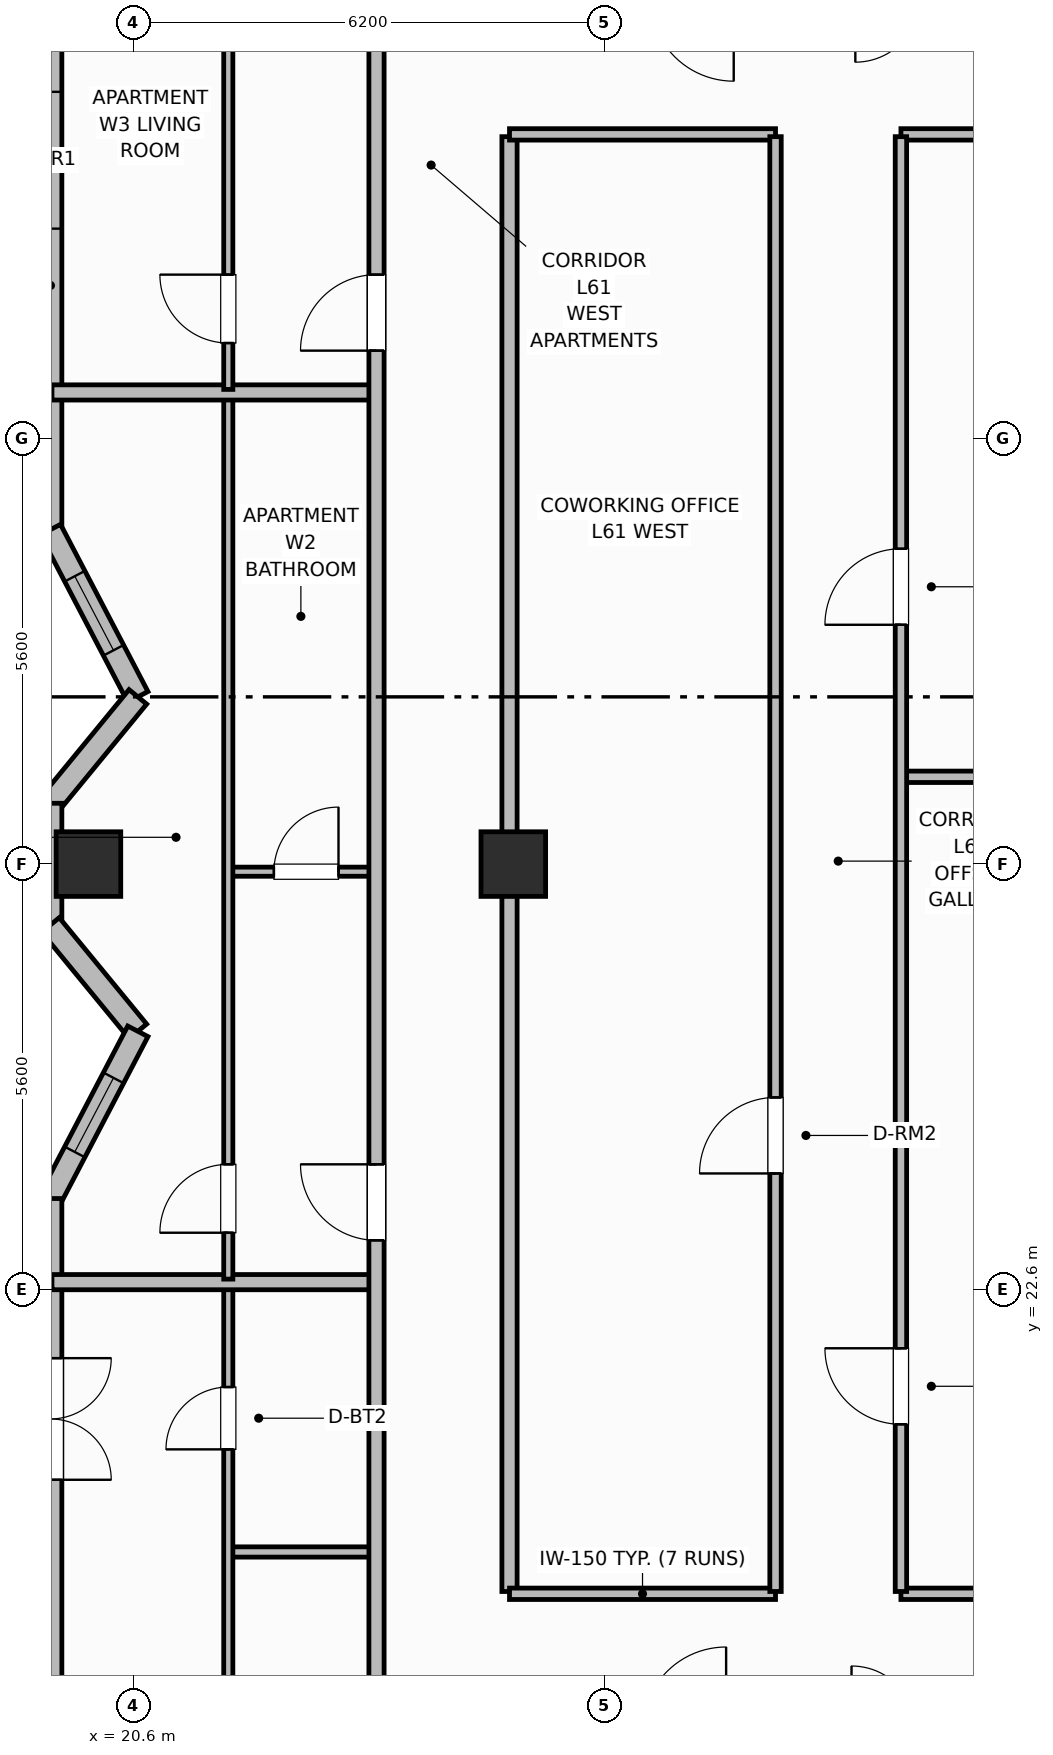
"""IFC4 building model, lengths in metres.
Left out: names, types, materials, properties, quantities, classifications, styles, units other than length and angle.
Written with IfcOpenShell. Run it as: python <this file> out.ifc"""

import sys

from ifc_helpers import new_model, si_unit, direction, frame, frame_2d, origin, origin_2d, place, context, subcontext, project, spatial, rectangle, extrude, element, fill, save


model = new_model("IFC4")
c1 = context("Model", 3, precision=1e-05, world=origin(), true_north=direction((0.0, 1.0)))
c2 = subcontext(c1, "Body", "Model", "MODEL_VIEW")
j1 = project(units=[si_unit("LENGTHUNIT", "METRE"), si_unit("PLANEANGLEUNIT", "RADIAN")], contexts=[c1])
p1 = place(None, origin())
s1 = spatial("IfcSite", under=j1, at=p1, CompositionType="ELEMENT")
p2 = place(p1, origin())
s2 = spatial("IfcBuilding", under=s1, at=p2, CompositionType="ELEMENT")
p3 = place(p2, frame((0.0, 0.0, 244.3)))
s3 = spatial("IfcBuildingStorey", under=s2, at=p3, CompositionType="ELEMENT", Elevation=244.3)
for number, where, z_axis, x_axis in (
    (1, (25.6, 28.2, 0.0), (0.0, 0.0, 1.0), (1.0, 0.0, 0.0)),
    (2, (20.01, 28.2, 0.0), (0.0, 0.0, 1.0), (1.0, 0.0, 0.0)),
):
    element("IfcColumn", number, at=place(p3, frame(where, z_axis=z_axis, x_axis=x_axis)), inside=s3, PredefinedType="COLUMN", context=c2, shape_type="SweptSolid", body=[
        extrude(rectangle(XDim=0.85, YDim=0.85, at=origin_2d()), origin(), (0.0, 0.0, 1.0), 3.7),
    ])
p4 = place(p3, frame((19.51, 43.72, 0.0), z_axis=(0.0, 0.0, 1.0), x_axis=(0.0, -1.0, 0.0)))
e3 = element("IfcWall", 3, at=p4, inside=s3, PredefinedType="SOLIDWALL", context=c2, shape_type="SweptSolid", body=[
    extrude(rectangle(XDim=11.12, YDim=0.3, at=frame_2d((5.56, 0.0))), origin(), (0.0, 0.0, 1.0), 2.73),
])
p5 = place(p4, frame((0.16, 0.0, 0.72)))
e4 = element("IfcOpeningElement", 4, at=p5, cuts=e3, PredefinedType="OPENING", context=c2, shape_type="SweptSolid", body=[
    extrude(rectangle(XDim=1.4, YDim=1.85, at=frame_2d((0.7, 0.925))), frame((0.0, 0.16, 0.0), z_axis=(0.0, -1.0, 0.0), x_axis=(1.0, 0.0, 0.0)), (0.0, 0.0, 1.0), 0.32),
])
p6 = place(p4, frame((5.36, 0.0, 0.76)))
e5 = element("IfcOpeningElement", 5, at=p6, cuts=e3, PredefinedType="OPENING", context=c2, shape_type="SweptSolid", body=[
    extrude(rectangle(XDim=1.8, YDim=1.85, at=frame_2d((0.9, 0.925))), frame((0.0, 0.16, 0.0), z_axis=(0.0, -1.0, 0.0), x_axis=(1.0, 0.0, 0.0)), (0.0, 0.0, 1.0), 0.32),
])
p7 = place(p3, frame((19.51, 32.6, 0.0), z_axis=(0.0, 0.0, 1.0), x_axis=(0.463191013929, -0.88625847506, 0.0)))
e6 = element("IfcWall", 6, at=p7, inside=s3, PredefinedType="SOLIDWALL", context=c2, shape_type="SweptSolid", body=[
    extrude(rectangle(XDim=2.483, YDim=0.3, at=frame_2d((1.241, 0.0))), origin(), (0.0, 0.0, 1.0), 2.73),
])
p8 = place(p7, frame((0.691, 0.0, 0.92)))
e7 = element("IfcOpeningElement", 7, at=p8, cuts=e6, PredefinedType="OPENING", context=c2, shape_type="SweptSolid", body=[
    extrude(rectangle(XDim=1.1, YDim=1.65, at=frame_2d((0.55, 0.825))), frame((0.0, 0.16, 0.0), z_axis=(0.0, -1.0, 0.0), x_axis=(1.0, 0.0, 0.0)), (0.0, 0.0, 1.0), 0.32),
])
p9 = place(p3, frame((20.66, 30.4, 0.0), z_axis=(0.0, 0.0, 1.0), x_axis=(-0.634733675645, -0.772730975827, 0.0)))
e8 = element("IfcWall", 8, at=p9, inside=s3, PredefinedType="SOLIDWALL", context=c2, shape_type="SweptSolid", body=[
    extrude(rectangle(XDim=1.812, YDim=0.3, at=frame_2d((0.906, 0.0))), origin(), (0.0, 0.0, 1.0), 2.73),
])
p10 = place(p3, frame((19.51, 29.0, 0.0), z_axis=(0.0, 0.0, 1.0), x_axis=(0.0, -1.0, 0.0)))
e9 = element("IfcWall", 9, at=p10, inside=s3, PredefinedType="SOLIDWALL", context=c2, shape_type="SweptSolid", body=[
    extrude(rectangle(XDim=1.6, YDim=0.3, at=frame_2d((0.8, 0.0))), origin(), (0.0, 0.0, 1.0), 2.73),
])
p11 = place(p3, frame((19.51, 27.4, 0.0), z_axis=(0.0, 0.0, 1.0), x_axis=(0.634733675645, -0.772730975827, 0.0)))
e10 = element("IfcWall", 10, at=p11, inside=s3, PredefinedType="SOLIDWALL", context=c2, shape_type="SweptSolid", body=[
    extrude(rectangle(XDim=1.812, YDim=0.3, at=frame_2d((0.906, 0.0))), origin(), (0.0, 0.0, 1.0), 2.73),
])
p12 = place(p3, frame((20.66, 26.0, 0.0), z_axis=(0.0, 0.0, 1.0), x_axis=(-0.46323138706, -0.886237373418, 0.0)))
e11 = element("IfcWall", 11, at=p12, inside=s3, PredefinedType="SOLIDWALL", context=c2, shape_type="SweptSolid", body=[
    extrude(rectangle(XDim=2.482, YDim=0.3, at=frame_2d((1.241, 0.0))), origin(), (0.0, 0.0, 1.0), 2.73),
])
p13 = place(p12, frame((0.691, 0.0, 0.92)))
e12 = element("IfcOpeningElement", 12, at=p13, cuts=e11, PredefinedType="OPENING", context=c2, shape_type="SweptSolid", body=[
    extrude(rectangle(XDim=1.1, YDim=1.65, at=frame_2d((0.55, 0.825))), frame((0.0, 0.16, 0.0), z_axis=(0.0, -1.0, 0.0), x_axis=(1.0, 0.0, 0.0)), (0.0, 0.0, 1.0), 0.32),
])
p14 = place(p3, frame((19.51, 23.8, 0.0), z_axis=(0.0, 0.0, 1.0), x_axis=(0.0, -1.0, 0.0)))
e13 = element("IfcWall", 13, at=p14, inside=s3, PredefinedType="SOLIDWALL", context=c2, shape_type="SweptSolid", body=[
    extrude(rectangle(XDim=11.12, YDim=0.3, at=frame_2d((5.56, 0.0))), origin(), (0.0, 0.0, 1.0), 2.73),
])
p15 = place(p14, frame((2.1, 0.0, 0.0)))
e14 = element("IfcOpeningElement", 14, at=p15, cuts=e13, PredefinedType="OPENING", context=c2, shape_type="SweptSolid", body=[
    extrude(rectangle(XDim=1.6, YDim=2.1, at=frame_2d((0.8, 1.05))), frame((0.0, 0.16, 0.0), z_axis=(0.0, -1.0, 0.0), x_axis=(1.0, 0.0, 0.0)), (0.0, 0.0, 1.0), 0.32),
])
p16 = place(p3, frame((25.55, 18.63, 0.0), z_axis=(0.0, 0.0, 1.0), x_axis=(0.0, 1.0, 0.0)))
e15 = element("IfcWall", 15, at=p16, inside=s3, PredefinedType="PARTITIONING", context=c2, shape_type="SweptSolid", body=[
    extrude(rectangle(XDim=19.14, YDim=0.2, at=frame_2d((9.57, 0.0))), origin(), (0.0, 0.0, 1.0), 2.56),
])
p17 = place(p3, frame((25.55, 18.6, 0.0), z_axis=(0.0, 0.0, 1.0), x_axis=(1.0, 0.0, 0.0)))
e16 = element("IfcWall", 16, at=p17, inside=s3, PredefinedType="PARTITIONING", context=c2, shape_type="SweptSolid", body=[
    extrude(rectangle(XDim=3.5, YDim=0.15, at=frame_2d((1.75, 0.0))), origin(), (0.0, 0.0, 1.0), 2.56),
])
p18 = place(p3, frame((30.7, 18.6, 0.0), z_axis=(0.0, 0.0, 1.0), x_axis=(1.0, 0.0, 0.0)))
e17 = element("IfcWall", 17, at=p18, inside=s3, PredefinedType="PARTITIONING", context=c2, shape_type="SweptSolid", body=[
    extrude(rectangle(XDim=22.15, YDim=0.15, at=frame_2d((11.075, 0.0))), origin(), (0.0, 0.0, 1.0), 2.56),
])
p19 = place(p3, frame((25.55, 37.8, 0.0), z_axis=(0.0, 0.0, 1.0), x_axis=(1.0, 0.0, 0.0)))
e18 = element("IfcWall", 18, at=p19, inside=s3, PredefinedType="PARTITIONING", context=c2, shape_type="SweptSolid", body=[
    extrude(rectangle(XDim=3.5, YDim=0.15, at=frame_2d((1.75, 0.0))), origin(), (0.0, 0.0, 1.0), 2.56),
])
p20 = place(p3, frame((30.7, 37.8, 0.0), z_axis=(0.0, 0.0, 1.0), x_axis=(1.0, 0.0, 0.0)))
e19 = element("IfcWall", 19, at=p20, inside=s3, PredefinedType="PARTITIONING", context=c2, shape_type="SweptSolid", body=[
    extrude(rectangle(XDim=22.15, YDim=0.15, at=frame_2d((11.075, 0.0))), origin(), (0.0, 0.0, 1.0), 2.56),
])
p21 = place(p3, frame((30.73, 29.348, 0.0), z_axis=(0.0, 0.0, 1.0), x_axis=(1.0, 0.0, 0.0)))
e20 = element("IfcWall", 20, at=p21, inside=s3, PredefinedType="PARTITIONING", context=c2, shape_type="SweptSolid", body=[
    extrude(rectangle(XDim=22.07, YDim=0.15, at=frame_2d((11.035, 0.0))), origin(), (0.0, 0.0, 1.0), 2.56),
])
p22 = place(p3, frame((29.05, 18.63, 0.0), z_axis=(0.0, 0.0, 1.0), x_axis=(0.0, 1.0, 0.0)))
e21 = element("IfcWall", 21, at=p22, inside=s3, PredefinedType="PARTITIONING", context=c2, shape_type="SweptSolid", body=[
    extrude(rectangle(XDim=19.14, YDim=0.15, at=frame_2d((9.57, 0.0))), origin(), (0.0, 0.0, 1.0), 2.56),
])
p23 = place(p22, frame((5.5, 0.0, 0.0)))
e22 = element("IfcOpeningElement", 22, at=p23, cuts=e21, PredefinedType="OPENING", context=c2, shape_type="SweptSolid", body=[
    extrude(rectangle(XDim=1.0, YDim=2.15, at=frame_2d((0.5, 1.075))), frame((0.0, 0.085, 0.0), z_axis=(0.0, -1.0, 0.0), x_axis=(1.0, 0.0, 0.0)), (0.0, 0.0, 1.0), 0.17),
])
p24 = place(p3, frame((30.7, 18.63, 0.0), z_axis=(0.0, 0.0, 1.0), x_axis=(0.0, 1.0, 0.0)))
e23 = element("IfcWall", 23, at=p24, inside=s3, PredefinedType="PARTITIONING", context=c2, shape_type="SweptSolid", body=[
    extrude(rectangle(XDim=19.14, YDim=0.15, at=frame_2d((9.57, 0.0))), origin(), (0.0, 0.0, 1.0), 2.56),
])
p25 = place(p24, frame((2.2, 0.0, 0.0)))
e24 = element("IfcOpeningElement", 24, at=p25, cuts=e23, PredefinedType="OPENING", context=c2, shape_type="SweptSolid", body=[
    extrude(rectangle(XDim=1.0, YDim=2.15, at=frame_2d((0.5, 1.075))), frame((0.0, 0.085, 0.0), z_axis=(0.0, -1.0, 0.0), x_axis=(1.0, 0.0, 0.0)), (0.0, 0.0, 1.0), 0.17),
])
p26 = place(p24, frame((12.719, 0.0, 0.0)))
e25 = element("IfcOpeningElement", 25, at=p26, cuts=e23, PredefinedType="OPENING", context=c2, shape_type="SweptSolid", body=[
    extrude(rectangle(XDim=1.0, YDim=2.15, at=frame_2d((0.5, 1.075))), frame((0.0, 0.085, 0.0), z_axis=(0.0, -1.0, 0.0), x_axis=(1.0, 0.0, 0.0)), (0.0, 0.0, 1.0), 0.17),
])
p27 = place(p3, frame((21.85, 19.15, 0.0), z_axis=(0.0, 0.0, 1.0), x_axis=(1.0, 0.0, 0.0)))
e26 = element("IfcWall", 26, at=p27, inside=s3, PredefinedType="PARTITIONING", context=c2, shape_type="SweptSolid", body=[
    extrude(rectangle(XDim=1.95, YDim=0.135, at=frame_2d((0.975, 0.0))), origin(), (0.0, 0.0, 1.0), 2.56),
])
p28 = place(p3, frame((21.85, 9.99, 0.0), z_axis=(0.0, 0.0, 1.0), x_axis=(0.0, 1.0, 0.0)))
e27 = element("IfcWall", 27, at=p28, inside=s3, PredefinedType="PARTITIONING", context=c2, shape_type="SweptSolid", body=[
    extrude(rectangle(XDim=12.67, YDim=0.12, at=frame_2d((6.335, 0.0))), origin(), (0.0, 0.0, 1.0), 2.56),
])
p29 = place(p28, frame((0.41, 0.0, 0.0)))
e28 = element("IfcOpeningElement", 28, at=p29, cuts=e27, PredefinedType="OPENING", context=c2, shape_type="SweptSolid", body=[
    extrude(rectangle(XDim=0.9, YDim=2.1, at=frame_2d((0.45, 1.05))), frame((0.0, 0.07, 0.0), z_axis=(0.0, -1.0, 0.0), x_axis=(1.0, 0.0, 0.0)), (0.0, 0.0, 1.0), 0.14),
])
p30 = place(p28, frame((10.51, 0.0, 0.0)))
e29 = element("IfcOpeningElement", 29, at=p30, cuts=e27, PredefinedType="OPENING", context=c2, shape_type="SweptSolid", body=[
    extrude(rectangle(XDim=0.82, YDim=2.08, at=frame_2d((0.41, 1.04))), frame((0.0, 0.07, 0.0), z_axis=(0.0, -1.0, 0.0), x_axis=(1.0, 0.0, 0.0)), (0.0, 0.0, 1.0), 0.14),
])
p31 = place(p3, frame((19.53, 22.7, 0.0), z_axis=(0.0, 0.0, 1.0), x_axis=(1.0, 0.0, 0.0)))
e30 = element("IfcWall", 30, at=p31, inside=s3, PredefinedType="PARTITIONING", context=c2, shape_type="SweptSolid", body=[
    extrude(rectangle(XDim=4.27, YDim=0.2, at=frame_2d((2.135, 0.0))), origin(), (0.0, 0.0, 1.0), 2.56),
])
p32 = place(p3, frame((21.85, 28.1, 0.0), z_axis=(0.0, 0.0, 1.0), x_axis=(1.0, 0.0, 0.0)))
e31 = element("IfcWall", 31, at=p32, inside=s3, PredefinedType="PARTITIONING", context=c2, shape_type="SweptSolid", body=[
    extrude(rectangle(XDim=1.95, YDim=0.12, at=frame_2d((0.975, 0.0))), origin(), (0.0, 0.0, 1.0), 2.56),
])
p33 = place(p32, frame((0.6, 0.0, 0.0)))
e32 = element("IfcOpeningElement", 32, at=p33, cuts=e31, PredefinedType="OPENING", context=c2, shape_type="SweptSolid", body=[
    extrude(rectangle(XDim=0.85, YDim=2.1, at=frame_2d((0.425, 1.05))), frame((0.0, 0.07, 0.0), z_axis=(0.0, -1.0, 0.0), x_axis=(1.0, 0.0, 0.0)), (0.0, 0.0, 1.0), 0.14),
])
p34 = place(p3, frame((21.85, 22.74, 0.0), z_axis=(0.0, 0.0, 1.0), x_axis=(0.0, 1.0, 0.0)))
e33 = element("IfcWall", 33, at=p34, inside=s3, PredefinedType="PARTITIONING", context=c2, shape_type="SweptSolid", body=[
    extrude(rectangle(XDim=11.625, YDim=0.12, at=frame_2d((5.812, 0.0))), origin(), (0.0, 0.0, 1.0), 2.56),
])
p35 = place(p34, frame((0.61, 0.0, 0.0)))
e34 = element("IfcOpeningElement", 34, at=p35, cuts=e33, PredefinedType="OPENING", context=c2, shape_type="SweptSolid", body=[
    extrude(rectangle(XDim=0.9, YDim=2.1, at=frame_2d((0.45, 1.05))), frame((0.0, 0.07, 0.0), z_axis=(0.0, -1.0, 0.0), x_axis=(1.0, 0.0, 0.0)), (0.0, 0.0, 1.0), 0.14),
])
p36 = place(p3, frame((19.53, 34.405, 0.0), z_axis=(0.0, 0.0, 1.0), x_axis=(1.0, 0.0, 0.0)))
e35 = element("IfcWall", 35, at=p36, inside=s3, PredefinedType="PARTITIONING", context=c2, shape_type="SweptSolid", body=[
    extrude(rectangle(XDim=4.27, YDim=0.2, at=frame_2d((2.135, 0.0))), origin(), (0.0, 0.0, 1.0), 2.56),
])
p37 = place(p3, frame((21.85, 34.445, 0.0), z_axis=(0.0, 0.0, 1.0), x_axis=(0.0, 1.0, 0.0)))
e36 = element("IfcWall", 36, at=p37, inside=s3, PredefinedType="PARTITIONING", context=c2, shape_type="SweptSolid", body=[
    extrude(rectangle(XDim=11.965, YDim=0.12, at=frame_2d((5.982, 0.0))), origin(), (0.0, 0.0, 1.0), 2.56),
])
p38 = place(p37, frame((0.61, 0.0, 0.0)))
e37 = element("IfcOpeningElement", 37, at=p38, cuts=e36, PredefinedType="OPENING", context=c2, shape_type="SweptSolid", body=[
    extrude(rectangle(XDim=0.9, YDim=2.1, at=frame_2d((0.45, 1.05))), frame((0.0, 0.07, 0.0), z_axis=(0.0, -1.0, 0.0), x_axis=(1.0, 0.0, 0.0)), (0.0, 0.0, 1.0), 0.14),
])
p39 = place(p37, frame((10.157, 0.0, 0.0)))
e38 = element("IfcOpeningElement", 38, at=p39, cuts=e36, PredefinedType="OPENING", context=c2, shape_type="SweptSolid", body=[
    extrude(rectangle(XDim=0.82, YDim=2.08, at=frame_2d((0.41, 1.04))), frame((0.0, 0.07, 0.0), z_axis=(0.0, -1.0, 0.0), x_axis=(1.0, 0.0, 0.0)), (0.0, 0.0, 1.0), 0.14),
])
p40 = place(p3, frame((23.8, 9.95, 0.0), z_axis=(0.0, 0.0, 1.0), x_axis=(0.0, 1.0, 0.0)))
e39 = element("IfcWall", 39, at=p40, inside=s3, PredefinedType="PARTITIONING", context=c2, shape_type="SweptSolid", body=[
    extrude(rectangle(XDim=36.5, YDim=0.2, at=frame_2d((18.25, 0.0))), origin(), (0.0, 0.0, 1.0), 2.56),
])
p41 = place(p40, frame((3.25, 0.0, 0.0)))
e40 = element("IfcOpeningElement", 40, at=p41, cuts=e39, PredefinedType="OPENING", context=c2, shape_type="SweptSolid", body=[
    extrude(rectangle(XDim=1.0, YDim=2.15, at=frame_2d((0.5, 1.075))), frame((0.0, 0.11, 0.0), z_axis=(0.0, -1.0, 0.0), x_axis=(1.0, 0.0, 0.0)), (0.0, 0.0, 1.0), 0.22),
])
p42 = place(p40, frame((13.3, 0.0, 0.0)))
e41 = element("IfcOpeningElement", 41, at=p42, cuts=e39, PredefinedType="OPENING", context=c2, shape_type="SweptSolid", body=[
    extrude(rectangle(XDim=1.0, YDim=2.15, at=frame_2d((0.5, 1.075))), frame((0.0, 0.11, 0.0), z_axis=(0.0, -1.0, 0.0), x_axis=(1.0, 0.0, 0.0)), (0.0, 0.0, 1.0), 0.22),
])
p43 = place(p40, frame((25.005, 0.0, 0.0)))
e42 = element("IfcOpeningElement", 42, at=p43, cuts=e39, PredefinedType="OPENING", context=c2, shape_type="SweptSolid", body=[
    extrude(rectangle(XDim=1.0, YDim=2.15, at=frame_2d((0.5, 1.075))), frame((0.0, 0.11, 0.0), z_axis=(0.0, -1.0, 0.0), x_axis=(1.0, 0.0, 0.0)), (0.0, 0.0, 1.0), 0.22),
])
p44 = place(p6, origin())
e43 = element("IfcWindow", 43, at=p44, inside=s3, PartitioningType="SINGLE_PANEL", PredefinedType="WINDOW", context=c2, shape_type="SweptSolid", body=[
    extrude(rectangle(XDim=1.8, YDim=1.85, at=frame_2d((0.9, 0.925))), frame((0.0, 0.03, 0.0), z_axis=(0.0, -1.0, 0.0), x_axis=(1.0, 0.0, 0.0)), (0.0, 0.0, 1.0), 0.06),
])
fill(e5, e43)
p45 = place(p8, origin())
e44 = element("IfcWindow", 44, at=p45, inside=s3, PartitioningType="SINGLE_PANEL", PredefinedType="WINDOW", context=c2, shape_type="SweptSolid", body=[
    extrude(rectangle(XDim=1.1, YDim=1.65, at=frame_2d((0.55, 0.825))), frame((0.0, 0.03, 0.0), z_axis=(0.0, -1.0, 0.0), x_axis=(1.0, 0.0, 0.0)), (0.0, 0.0, 1.0), 0.06),
])
fill(e7, e44)
p46 = place(p13, origin())
e45 = element("IfcWindow", 45, at=p46, inside=s3, PartitioningType="SINGLE_PANEL", PredefinedType="WINDOW", context=c2, shape_type="SweptSolid", body=[
    extrude(rectangle(XDim=1.1, YDim=1.65, at=frame_2d((0.55, 0.825))), frame((0.0, 0.03, 0.0), z_axis=(0.0, -1.0, 0.0), x_axis=(1.0, 0.0, 0.0)), (0.0, 0.0, 1.0), 0.06),
])
fill(e12, e45)
p47 = place(p15, origin())
e46 = element("IfcDoor", 46, at=p47, inside=s3, OperationType="DOUBLE_DOOR_SINGLE_SWING", PredefinedType="DOOR", context=c2, shape_type="SweptSolid", body=[
    extrude(rectangle(XDim=1.6, YDim=2.1, at=frame_2d((0.8, 1.05))), frame((0.0, 0.025, 0.0), z_axis=(0.0, -1.0, 0.0), x_axis=(1.0, 0.0, 0.0)), (0.0, 0.0, 1.0), 0.05),
])
fill(e14, e46)
p48 = place(p23, origin())
e47 = element("IfcDoor", 47, at=p48, inside=s3, OperationType="SINGLE_SWING_LEFT", PredefinedType="DOOR", context=c2, shape_type="SweptSolid", body=[
    extrude(rectangle(XDim=1.0, YDim=2.15, at=frame_2d((0.5, 1.075))), frame((0.0, 0.025, 0.0), z_axis=(0.0, -1.0, 0.0), x_axis=(1.0, 0.0, 0.0)), (0.0, 0.0, 1.0), 0.05),
])
fill(e22, e47)
p49 = place(p25, origin())
e48 = element("IfcDoor", 48, at=p49, inside=s3, OperationType="SINGLE_SWING_RIGHT", PredefinedType="DOOR", context=c2, shape_type="SweptSolid", body=[
    extrude(rectangle(XDim=1.0, YDim=2.15, at=frame_2d((0.5, 1.075))), frame((0.0, 0.025, 0.0), z_axis=(0.0, -1.0, 0.0), x_axis=(1.0, 0.0, 0.0)), (0.0, 0.0, 1.0), 0.05),
])
fill(e24, e48)
p50 = place(p26, origin())
e49 = element("IfcDoor", 49, at=p50, inside=s3, OperationType="SINGLE_SWING_LEFT", PredefinedType="DOOR", context=c2, shape_type="SweptSolid", body=[
    extrude(rectangle(XDim=1.0, YDim=2.15, at=frame_2d((0.5, 1.075))), frame((0.0, 0.025, 0.0), z_axis=(0.0, -1.0, 0.0), x_axis=(1.0, 0.0, 0.0)), (0.0, 0.0, 1.0), 0.05),
])
fill(e25, e49)
p51 = place(p30, origin())
e50 = element("IfcDoor", 50, at=p51, inside=s3, OperationType="SINGLE_SWING_LEFT", PredefinedType="DOOR", context=c2, shape_type="SweptSolid", body=[
    extrude(rectangle(XDim=0.82, YDim=2.08, at=frame_2d((0.41, 1.04))), frame((0.0, 0.025, 0.0), z_axis=(0.0, -1.0, 0.0), x_axis=(1.0, 0.0, 0.0)), (0.0, 0.0, 1.0), 0.05),
])
fill(e29, e50)
p52 = place(p33, origin())
e51 = element("IfcDoor", 51, at=p52, inside=s3, OperationType="SINGLE_SWING_RIGHT", PredefinedType="DOOR", context=c2, shape_type="SweptSolid", body=[
    extrude(rectangle(XDim=0.85, YDim=2.1, at=frame_2d((0.425, 1.05))), frame((0.0, 0.025, 0.0), z_axis=(0.0, -1.0, 0.0), x_axis=(1.0, 0.0, 0.0)), (0.0, 0.0, 1.0), 0.05),
])
fill(e32, e51)
p53 = place(p35, origin())
e52 = element("IfcDoor", 52, at=p53, inside=s3, OperationType="SINGLE_SWING_LEFT", PredefinedType="DOOR", context=c2, shape_type="SweptSolid", body=[
    extrude(rectangle(XDim=0.9, YDim=2.1, at=frame_2d((0.45, 1.05))), frame((0.0, 0.025, 0.0), z_axis=(0.0, -1.0, 0.0), x_axis=(1.0, 0.0, 0.0)), (0.0, 0.0, 1.0), 0.05),
])
fill(e34, e52)
p54 = place(p38, origin())
e53 = element("IfcDoor", 53, at=p54, inside=s3, OperationType="SINGLE_SWING_RIGHT", PredefinedType="DOOR", context=c2, shape_type="SweptSolid", body=[
    extrude(rectangle(XDim=0.9, YDim=2.1, at=frame_2d((0.45, 1.05))), frame((0.0, 0.025, 0.0), z_axis=(0.0, -1.0, 0.0), x_axis=(1.0, 0.0, 0.0)), (0.0, 0.0, 1.0), 0.05),
])
fill(e37, e53)
p55 = place(p42, origin())
e54 = element("IfcDoor", 54, at=p55, inside=s3, OperationType="SINGLE_SWING_RIGHT", PredefinedType="DOOR", context=c2, shape_type="SweptSolid", body=[
    extrude(rectangle(XDim=1.0, YDim=2.15, at=frame_2d((0.5, 1.075))), frame((0.0, 0.025, 0.0), z_axis=(0.0, -1.0, 0.0), x_axis=(1.0, 0.0, 0.0)), (0.0, 0.0, 1.0), 0.05),
])
fill(e41, e54)
p56 = place(p43, origin())
e55 = element("IfcDoor", 55, at=p56, inside=s3, OperationType="SINGLE_SWING_LEFT", PredefinedType="DOOR", context=c2, shape_type="SweptSolid", body=[
    extrude(rectangle(XDim=1.0, YDim=2.15, at=frame_2d((0.5, 1.075))), frame((0.0, 0.025, 0.0), z_axis=(0.0, -1.0, 0.0), x_axis=(1.0, 0.0, 0.0)), (0.0, 0.0, 1.0), 0.05),
])
fill(e42, e55)
save(model, sys.argv[1])
